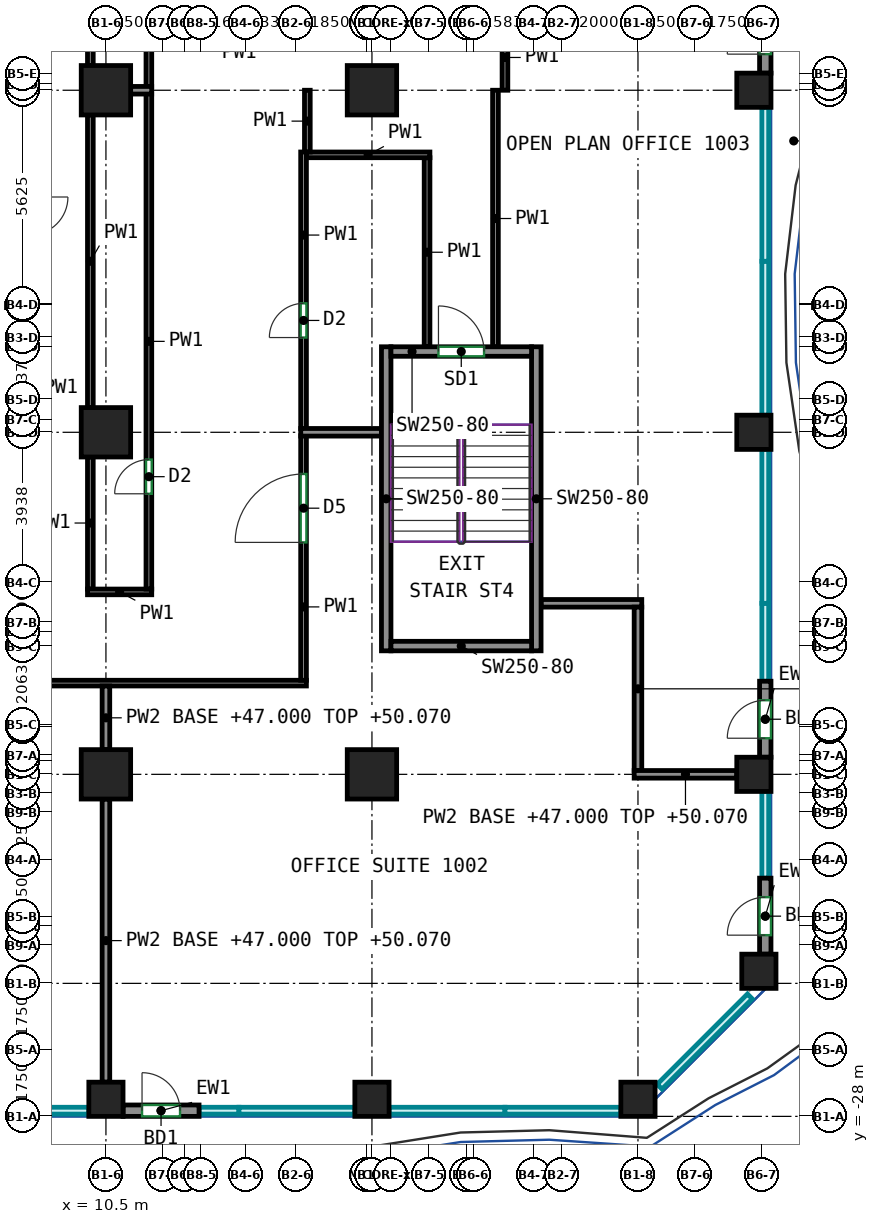
"""IFC4 building model, lengths in metres.
Left out: names, types, materials, properties, quantities, classifications, styles, units other than length and angle.
Written with IfcOpenShell. Run it as: python <this file> out.ifc"""

import sys

from ifc_helpers import new_model, si_unit, direction, frame, frame_2d, origin, origin_2d, place, context, subcontext, project, spatial, rectangle, extrude, source, transform, mapped, element, fill, save


model = new_model("IFC4")
c1 = context("Model", 3, precision=1e-05, world=origin(), true_north=direction((0.0, 1.0)))
c2 = subcontext(c1, "Body", "Model", "MODEL_VIEW")
j1 = project(units=[si_unit("LENGTHUNIT", "METRE"), si_unit("PLANEANGLEUNIT", "RADIAN")], contexts=[c1])
p1 = place(None, origin())
s1 = spatial("IfcSite", under=j1, at=p1, CompositionType="ELEMENT")
p2 = place(p1, origin())
s2 = spatial("IfcBuilding", under=s1, at=p2, CompositionType="ELEMENT")
p3 = place(p2, frame((0.0, 0.0, 47.0)))
s3 = spatial("IfcBuildingStorey", under=s2, at=p3, CompositionType="ELEMENT", Elevation=47.0)
m1 = source(origin(), c2, "Body", "SweptSolid", [
    extrude(rectangle(XDim=0.9, YDim=0.9, at=origin_2d()), origin(), (0.0, 0.0, 1.0), 3.72),
])
p4 = place(p3, frame((10.5, -27.55, 0.0), z_axis=(0.0, 0.0, 1.0), x_axis=(1.0, 0.0, 0.0)))
e1 = element("IfcColumn", 1, at=p4, inside=s3, PredefinedType="COLUMN", context=c2, shape_type="MappedRepresentation", body=[
    mapped(m1, transform((0.0, 0.0, 0.0))),
])
m2 = source(origin(), c2, "Body", "SweptSolid", [
    extrude(rectangle(XDim=1.3, YDim=1.3, at=origin_2d()), origin(), (0.0, 0.0, 1.0), 3.72),
])
for number, where, z_axis, x_axis in (
    (2, (10.5, -19.0, 0.0), (0.0, 0.0, 1.0), (1.0, 0.0, 0.0)),
    (3, (10.5, -10.0, 0.0), (0.0, 0.0, 1.0), (1.0, 0.0, 0.0)),
    (4, (10.5, -1.0, 0.0), (0.0, 0.0, 1.0), (1.0, 0.0, 0.0)),
):
    element("IfcColumn", number, at=place(p3, frame(where, z_axis=z_axis, x_axis=x_axis)), inside=s3, PredefinedType="COLUMN", context=c2, shape_type="MappedRepresentation", body=[
        mapped(m2, transform((0.0, 0.0, 0.0))),
    ])
p5 = place(p3, frame((17.5, -27.55, 0.0), z_axis=(0.0, 0.0, 1.0), x_axis=(1.0, 0.0, 0.0)))
e5 = element("IfcColumn", 5, at=p5, inside=s3, PredefinedType="COLUMN", context=c2, shape_type="MappedRepresentation", body=[
    mapped(m1, transform((0.0, 0.0, 0.0))),
])
for number, where, z_axis, x_axis in (
    (6, (17.5, -19.0, 0.0), (0.0, 0.0, 1.0), (1.0, 0.0, 0.0)),
    (7, (17.5, -1.0, 0.0), (0.0, 0.0, 1.0), (1.0, 0.0, 0.0)),
):
    element("IfcColumn", number, at=place(p3, frame(where, z_axis=z_axis, x_axis=x_axis)), inside=s3, PredefinedType="COLUMN", context=c2, shape_type="MappedRepresentation", body=[
        mapped(m2, transform((0.0, 0.0, 0.0))),
    ])
for number, where, z_axis, x_axis in (
    (8, (24.5, -27.55, 0.0), (0.0, 0.0, 1.0), (1.0, 0.0, 0.0)),
    (9, (27.55, -19.0, 0.0), (0.0, 0.0, 1.0), (1.0, 0.0, 0.0)),
    (10, (27.55, -10.0, 0.0), (0.0, 0.0, 1.0), (1.0, 0.0, 0.0)),
    (11, (27.55, -1.0, 0.0), (0.0, 0.0, 1.0), (1.0, 0.0, 0.0)),
    (12, (27.682, -24.182, 0.0), (0.0, 0.0, 1.0), (1.0, 0.0, 0.0)),
):
    element("IfcColumn", number, at=place(p3, frame(where, z_axis=z_axis, x_axis=x_axis)), inside=s3, PredefinedType="COLUMN", context=c2, shape_type="MappedRepresentation", body=[
        mapped(m1, transform((0.0, 0.0, 0.0))),
    ])
m3 = source(origin(), c2, "Body", "SweptSolid", [
    extrude(rectangle(XDim=8.0, YDim=0.25, at=frame_2d((4.0, 0.0))), origin(), (0.0, 0.0, 1.0), 3.72),
])
for number, where, z_axis, x_axis in (
    (13, (17.875, -15.75, 0.0), (0.0, 0.0, 1.0), (0.0, 1.0, 0.0)),
    (14, (21.825, -15.75, 0.0), (0.0, 0.0, 1.0), (0.0, 1.0, 0.0)),
):
    element("IfcWall", number, at=place(p3, frame(where, z_axis=z_axis, x_axis=x_axis)), inside=s3, PredefinedType="SHEAR", context=c2, shape_type="MappedRepresentation", body=[
        mapped(m3, transform((0.0, 0.0, 0.0))),
    ])
m4 = source(origin(), c2, "Body", "SweptSolid", [
    extrude(rectangle(XDim=3.7, YDim=0.25, at=frame_2d((1.85, 0.0))), origin(), (0.0, 0.0, 1.0), 3.72),
])
p6 = place(p3, frame((18.0, -15.625, 0.0), z_axis=(0.0, 0.0, 1.0), x_axis=(1.0, 0.0, 0.0)))
e15 = element("IfcWall", 15, at=p6, inside=s3, PredefinedType="SHEAR", context=c2, shape_type="MappedRepresentation", body=[
    mapped(m4, transform((0.0, 0.0, 0.0))),
])
p7 = place(p3, frame((18.0, -7.875, 0.0), z_axis=(0.0, 0.0, 1.0), x_axis=(1.0, 0.0, 0.0)))
e16 = element("IfcWall", 16, at=p7, inside=s3, PredefinedType="SHEAR", context=c2, shape_type="MappedRepresentation", body=[
    mapped(m4, transform((0.0, 0.0, 0.0))),
])
p8 = place(p7, frame((1.25, 0.0, 0.0)))
e17 = element("IfcOpeningElement", 17, at=p8, cuts=e16, PredefinedType="OPENING", context=c2, shape_type="SweptSolid", body=[
    extrude(rectangle(XDim=1.2, YDim=2.1, at=frame_2d((0.6, 1.05))), frame((0.0, 0.135, 0.0), z_axis=(0.0, -1.0, 0.0), x_axis=(1.0, 0.0, 0.0)), (0.0, 0.0, 1.0), 0.27),
])
m5 = source(origin(), c2, "Body", "SweptSolid", [
    extrude(rectangle(XDim=2.0, YDim=0.3, at=frame_2d((1.0, 0.0))), origin(), (0.0, 0.0, 1.0), 3.72),
])
p9 = place(p3, frame((10.95, -27.85, 0.0), z_axis=(0.0, 0.0, 1.0), x_axis=(1.0, 0.0, 0.0)))
e18 = element("IfcWall", 18, at=p9, inside=s3, PredefinedType="SOLIDWALL", context=c2, shape_type="MappedRepresentation", body=[
    mapped(m5, transform((0.0, 0.0, 0.0))),
])
p10 = place(p9, frame((0.5, 0.0, 0.0)))
e19 = element("IfcOpeningElement", 19, at=p10, cuts=e18, PredefinedType="OPENING", context=c2, shape_type="SweptSolid", body=[
    extrude(rectangle(XDim=1.0, YDim=2.1, at=frame_2d((0.5, 1.05))), frame((0.0, 0.16, 0.0), z_axis=(0.0, -1.0, 0.0), x_axis=(1.0, 0.0, 0.0)), (0.0, 0.0, 1.0), 0.32),
])
p11 = place(p3, frame((27.85, -23.732, 0.0), z_axis=(0.0, 0.0, 1.0), x_axis=(0.0, 1.0, 0.0)))
e20 = element("IfcWall", 20, at=p11, inside=s3, PredefinedType="SOLIDWALL", context=c2, shape_type="MappedRepresentation", body=[
    mapped(m5, transform((0.0, 0.0, 0.0))),
])
p12 = place(p11, frame((0.5, 0.0, 0.0)))
e21 = element("IfcOpeningElement", 21, at=p12, cuts=e20, PredefinedType="OPENING", context=c2, shape_type="SweptSolid", body=[
    extrude(rectangle(XDim=1.0, YDim=2.1, at=frame_2d((0.5, 1.05))), frame((0.0, 0.16, 0.0), z_axis=(0.0, -1.0, 0.0), x_axis=(1.0, 0.0, 0.0)), (0.0, 0.0, 1.0), 0.32),
])
p13 = place(p3, frame((27.85, -18.55, 0.0), z_axis=(0.0, 0.0, 1.0), x_axis=(0.0, 1.0, 0.0)))
e22 = element("IfcWall", 22, at=p13, inside=s3, PredefinedType="SOLIDWALL", context=c2, shape_type="MappedRepresentation", body=[
    mapped(m5, transform((0.0, 0.0, 0.0))),
])
p14 = place(p13, frame((0.5, 0.0, 0.0)))
e23 = element("IfcOpeningElement", 23, at=p14, cuts=e22, PredefinedType="OPENING", context=c2, shape_type="SweptSolid", body=[
    extrude(rectangle(XDim=1.0, YDim=2.1, at=frame_2d((0.5, 1.05))), frame((0.0, 0.16, 0.0), z_axis=(0.0, -1.0, 0.0), x_axis=(1.0, 0.0, 0.0)), (0.0, 0.0, 1.0), 0.32),
])
p15 = place(p3, frame((27.85, -0.55, 0.0), z_axis=(0.0, 0.0, 1.0), x_axis=(0.0, 1.0, 0.0)))
e24 = element("IfcWall", 24, at=p15, inside=s3, PredefinedType="SOLIDWALL", context=c2, shape_type="MappedRepresentation", body=[
    mapped(m5, transform((0.0, 0.0, 0.0))),
])
p16 = place(p15, frame((0.5, 0.0, 0.0)))
e25 = element("IfcOpeningElement", 25, at=p16, cuts=e24, PredefinedType="OPENING", context=c2, shape_type="SweptSolid", body=[
    extrude(rectangle(XDim=1.0, YDim=2.1, at=frame_2d((0.5, 1.05))), frame((0.0, 0.16, 0.0), z_axis=(0.0, -1.0, 0.0), x_axis=(1.0, 0.0, 0.0)), (0.0, 0.0, 1.0), 0.32),
])
p17 = place(p3, frame((10.09, -9.35, 0.0), z_axis=(0.0, 0.0, 1.0), x_axis=(0.0, 1.0, 0.0)))
e26 = element("IfcWall", 26, at=p17, inside=s3, PredefinedType="PARTITIONING", context=c2, shape_type="SweptSolid", body=[
    extrude(rectangle(XDim=7.7, YDim=0.15, at=frame_2d((3.85, 0.0))), origin(), (0.0, 0.0, 1.0), 3.72),
])
p18 = place(p3, frame((10.09, -14.125, 0.0), z_axis=(0.0, 0.0, 1.0), x_axis=(0.0, 1.0, 0.0)))
e27 = element("IfcWall", 27, at=p18, inside=s3, PredefinedType="PARTITIONING", context=c2, shape_type="SweptSolid", body=[
    extrude(rectangle(XDim=3.475, YDim=0.15, at=frame_2d((1.738, 0.0))), origin(), (0.0, 0.0, 1.0), 3.72),
])
p19 = place(p3, frame((10.015, -14.2, 0.0), z_axis=(0.0, 0.0, 1.0), x_axis=(1.0, 0.0, 0.0)))
e28 = element("IfcWall", 28, at=p19, inside=s3, PredefinedType="PARTITIONING", context=c2, shape_type="SweptSolid", body=[
    extrude(rectangle(XDim=1.69, YDim=0.15, at=frame_2d((0.845, 0.0))), origin(), (0.0, 0.0, 1.0), 3.72),
])
p20 = place(p3, frame((11.63, -14.125, 0.0), z_axis=(0.0, 0.0, 1.0), x_axis=(0.0, 1.0, 0.0)))
e29 = element("IfcWall", 29, at=p20, inside=s3, PredefinedType="PARTITIONING", context=c2, shape_type="SweptSolid", body=[
    extrude(rectangle(XDim=13.035, YDim=0.15, at=frame_2d((6.518, 0.0))), origin(), (0.0, 0.0, 1.0), 3.72),
])
p21 = place(p20, frame((2.507, 0.0, 0.0)))
e30 = element("IfcOpeningElement", 30, at=p21, cuts=e29, PredefinedType="OPENING", context=c2, shape_type="SweptSolid", body=[
    extrude(rectangle(XDim=0.9, YDim=2.1, at=frame_2d((0.45, 1.05))), frame((0.0, 0.085, 0.0), z_axis=(0.0, -1.0, 0.0), x_axis=(1.0, 0.0, 0.0)), (0.0, 0.0, 1.0), 0.17),
])
p22 = place(p3, frame((10.09, -0.35, 0.0), z_axis=(0.0, 0.0, 1.0), x_axis=(0.0, 1.0, 0.0)))
e31 = element("IfcWall", 31, at=p22, inside=s3, PredefinedType="PARTITIONING", context=c2, shape_type="SweptSolid", body=[
    extrude(rectangle(XDim=8.35, YDim=0.15, at=frame_2d((4.175, 0.0))), origin(), (0.0, 0.0, 1.0), 3.72),
])
p23 = place(p22, frame((4.732, 0.0, 0.0)))
e32 = element("IfcOpeningElement", 32, at=p23, cuts=e31, PredefinedType="OPENING", context=c2, shape_type="SweptSolid", body=[
    extrude(rectangle(XDim=0.9, YDim=2.1, at=frame_2d((0.45, 1.05))), frame((0.0, 0.085, 0.0), z_axis=(0.0, -1.0, 0.0), x_axis=(1.0, 0.0, 0.0)), (0.0, 0.0, 1.0), 0.17),
])
p24 = place(p3, frame((11.63, -0.91, 0.0), z_axis=(0.0, 0.0, 1.0), x_axis=(0.0, 1.0, 0.0)))
e33 = element("IfcWall", 33, at=p24, inside=s3, PredefinedType="PARTITIONING", context=c2, shape_type="SweptSolid", body=[
    extrude(rectangle(XDim=6.26, YDim=0.15, at=frame_2d((3.13, 0.0))), origin(), (0.0, 0.0, 1.0), 3.72),
])
p25 = place(p3, frame((-10.51, -16.6, 0.0), z_axis=(0.0, 0.0, 1.0), x_axis=(1.0, 0.0, 0.0)))
e34 = element("IfcWall", 34, at=p25, inside=s3, PredefinedType="PARTITIONING", context=c2, shape_type="SweptSolid", body=[
    extrude(rectangle(XDim=26.285, YDim=0.15, at=frame_2d((13.143, 0.0))), origin(), (0.0, 0.0, 1.0), 3.72),
])
p26 = place(p25, frame((7.708, 0.0, 0.0)))
e35 = element("IfcOpeningElement", 35, at=p26, cuts=e34, PredefinedType="OPENING", context=c2, shape_type="SweptSolid", body=[
    extrude(rectangle(XDim=1.8, YDim=2.1, at=frame_2d((0.9, 1.05))), frame((0.0, 0.085, 0.0), z_axis=(0.0, -1.0, 0.0), x_axis=(1.0, 0.0, 0.0)), (0.0, 0.0, 1.0), 0.17),
])
p27 = place(p3, frame((15.7, -16.525, 0.0), z_axis=(0.0, 0.0, 1.0), x_axis=(0.0, 1.0, 0.0)))
e36 = element("IfcWall", 36, at=p27, inside=s3, PredefinedType="PARTITIONING", context=c2, shape_type="SweptSolid", body=[
    extrude(rectangle(XDim=6.435, YDim=0.15, at=frame_2d((3.217, 0.0))), origin(), (0.0, 0.0, 1.0), 3.72),
])
p28 = place(p27, frame((3.628, 0.0, 0.0)))
e37 = element("IfcOpeningElement", 37, at=p28, cuts=e36, PredefinedType="OPENING", context=c2, shape_type="SweptSolid", body=[
    extrude(rectangle(XDim=1.8, YDim=2.1, at=frame_2d((0.9, 1.05))), frame((0.0, 0.085, 0.0), z_axis=(0.0, -1.0, 0.0), x_axis=(1.0, 0.0, 0.0)), (0.0, 0.0, 1.0), 0.17),
])
p29 = place(p3, frame((18.95, -2.775, 0.0), z_axis=(0.0, 0.0, 1.0), x_axis=(0.0, -1.0, 0.0)))
e38 = element("IfcWall", 38, at=p29, inside=s3, PredefinedType="PARTITIONING", context=c2, shape_type="SweptSolid", body=[
    extrude(rectangle(XDim=4.975, YDim=0.15, at=frame_2d((2.488, 0.0))), origin(), (0.0, 0.0, 1.0), 3.72),
])
p30 = place(p3, frame((15.775, -2.7, 0.0), z_axis=(0.0, 0.0, 1.0), x_axis=(1.0, 0.0, 0.0)))
e39 = element("IfcWall", 39, at=p30, inside=s3, PredefinedType="PARTITIONING", context=c2, shape_type="SweptSolid", body=[
    extrude(rectangle(XDim=3.25, YDim=0.15, at=frame_2d((1.625, 0.0))), origin(), (0.0, 0.0, 1.0), 3.72),
])
p31 = place(p3, frame((15.8, -2.625, 0.0), z_axis=(0.0, 0.0, 1.0), x_axis=(0.0, 1.0, 0.0)))
e40 = element("IfcWall", 40, at=p31, inside=s3, PredefinedType="PARTITIONING", context=c2, shape_type="SweptSolid", body=[
    extrude(rectangle(XDim=1.625, YDim=0.15, at=frame_2d((0.812, 0.0))), origin(), (0.0, 0.0, 1.0), 3.72),
])
p32 = place(p3, frame((15.7, -9.91, 0.0), z_axis=(0.0, 0.0, 1.0), x_axis=(0.0, 1.0, 0.0)))
e41 = element("IfcWall", 41, at=p32, inside=s3, PredefinedType="PARTITIONING", context=c2, shape_type="SweptSolid", body=[
    extrude(rectangle(XDim=7.285, YDim=0.15, at=frame_2d((3.643, 0.0))), origin(), (0.0, 0.0, 1.0), 3.72),
])
p33 = place(p32, frame((2.403, 0.0, 0.0)))
e42 = element("IfcOpeningElement", 42, at=p33, cuts=e41, PredefinedType="OPENING", context=c2, shape_type="SweptSolid", body=[
    extrude(rectangle(XDim=0.9, YDim=2.1, at=frame_2d((0.45, 1.05))), frame((0.0, 0.085, 0.0), z_axis=(0.0, -1.0, 0.0), x_axis=(1.0, 0.0, 0.0)), (0.0, 0.0, 1.0), 0.17),
])
p34 = place(p3, frame((21.0, -1.0, 0.0), z_axis=(0.0, 0.0, 1.0), x_axis=(0.0, 1.0, 0.0)))
e43 = element("IfcWall", 43, at=p34, inside=s3, PredefinedType="PARTITIONING", context=c2, shape_type="SweptSolid", body=[
    extrude(rectangle(XDim=1.725, YDim=0.15, at=frame_2d((0.863, 0.0))), origin(), (0.0, 0.0, 1.0), 3.72),
])
p35 = place(p3, frame((20.75, -7.75, 0.0), z_axis=(0.0, 0.0, 1.0), x_axis=(0.0, 1.0, 0.0)))
e44 = element("IfcWall", 44, at=p35, inside=s3, PredefinedType="PARTITIONING", context=c2, shape_type="SweptSolid", body=[
    extrude(rectangle(XDim=6.75, YDim=0.15, at=frame_2d((3.375, 0.0))), origin(), (0.0, 0.0, 1.0), 3.72),
])
p36 = place(p3, frame((11.15, -1.0, 0.0), z_axis=(0.0, 0.0, 1.0), x_axis=(1.0, 0.0, 0.0)))
e45 = element("IfcWall", 45, at=p36, inside=s3, PredefinedType="PARTITIONING", context=c2, shape_type="SweptSolid", body=[
    extrude(rectangle(XDim=0.554, YDim=0.2, at=frame_2d((0.277, 0.0))), origin(), (0.0, 0.0, 1.0), 3.72),
])
p37 = place(p3, frame((10.5, -18.35, 0.0), z_axis=(0.0, 0.0, 1.0), x_axis=(0.0, 1.0, 0.0)))
e46 = element("IfcWall", 46, at=p37, inside=s3, PredefinedType="PARTITIONING", context=c2, shape_type="SweptSolid", body=[
    extrude(rectangle(XDim=1.674, YDim=0.2, at=frame_2d((0.837, 0.0))), origin(), (0.0, 0.0, 1.0), 3.07),
])
p38 = place(p3, frame((10.5, -27.1, 0.0), z_axis=(0.0, 0.0, 1.0), x_axis=(0.0, 1.0, 0.0)))
e47 = element("IfcWall", 47, at=p38, inside=s3, PredefinedType="PARTITIONING", context=c2, shape_type="SweptSolid", body=[
    extrude(rectangle(XDim=7.45, YDim=0.2, at=frame_2d((3.725, 0.0))), origin(), (0.0, 0.0, 1.0), 3.07),
])
p39 = place(p3, frame((17.75, -10.0, 0.0), z_axis=(0.0, 0.0, 1.0), x_axis=(-1.0, 0.0, 0.0)))
e48 = element("IfcWall", 48, at=p39, inside=s3, PredefinedType="PARTITIONING", context=c2, shape_type="SweptSolid", body=[
    extrude(rectangle(XDim=2.124, YDim=0.2, at=frame_2d((1.062, 0.0))), origin(), (0.0, 0.0, 1.0), 3.72),
])
p40 = place(p3, frame((24.6, -14.5, 0.0), z_axis=(0.0, 0.0, 1.0), x_axis=(-1.0, 0.0, 0.0)))
e49 = element("IfcWall", 49, at=p40, inside=s3, PredefinedType="PARTITIONING", context=c2, shape_type="SweptSolid", body=[
    extrude(rectangle(XDim=2.65, YDim=0.2, at=frame_2d((1.325, 0.0))), origin(), (0.0, 0.0, 1.0), 3.72),
])
p41 = place(p3, frame((24.5, -18.9, 0.0), z_axis=(0.0, 0.0, 1.0), x_axis=(0.0, 1.0, 0.0)))
e50 = element("IfcWall", 50, at=p41, inside=s3, PredefinedType="PARTITIONING", context=c2, shape_type="SweptSolid", body=[
    extrude(rectangle(XDim=4.3, YDim=0.2, at=frame_2d((2.15, 0.0))), origin(), (0.0, 0.0, 1.0), 3.07),
])
p42 = place(p3, frame((27.1, -19.0, 0.0), z_axis=(0.0, 0.0, 1.0), x_axis=(-1.0, 0.0, 0.0)))
e51 = element("IfcWall", 51, at=p42, inside=s3, PredefinedType="PARTITIONING", context=c2, shape_type="SweptSolid", body=[
    extrude(rectangle(XDim=2.7, YDim=0.2, at=frame_2d((1.35, 0.0))), origin(), (0.0, 0.0, 1.0), 3.07),
])
p43 = place(p10, origin())
e52 = element("IfcDoor", 52, at=p43, inside=s3, OperationType="SINGLE_SWING_LEFT", PredefinedType="DOOR", context=c2, shape_type="SweptSolid", body=[
    extrude(rectangle(XDim=1.0, YDim=2.1, at=frame_2d((0.5, 1.05))), frame((0.0, 0.025, 0.0), z_axis=(0.0, -1.0, 0.0), x_axis=(1.0, 0.0, 0.0)), (0.0, 0.0, 1.0), 0.05),
])
fill(e19, e52)
p44 = place(p12, origin())
e53 = element("IfcDoor", 53, at=p44, inside=s3, OperationType="SINGLE_SWING_LEFT", PredefinedType="DOOR", context=c2, shape_type="SweptSolid", body=[
    extrude(rectangle(XDim=1.0, YDim=2.1, at=frame_2d((0.5, 1.05))), frame((0.0, 0.025, 0.0), z_axis=(0.0, -1.0, 0.0), x_axis=(1.0, 0.0, 0.0)), (0.0, 0.0, 1.0), 0.05),
])
fill(e21, e53)
p45 = place(p14, origin())
e54 = element("IfcDoor", 54, at=p45, inside=s3, OperationType="SINGLE_SWING_LEFT", PredefinedType="DOOR", context=c2, shape_type="SweptSolid", body=[
    extrude(rectangle(XDim=1.0, YDim=2.1, at=frame_2d((0.5, 1.05))), frame((0.0, 0.025, 0.0), z_axis=(0.0, -1.0, 0.0), x_axis=(1.0, 0.0, 0.0)), (0.0, 0.0, 1.0), 0.05),
])
fill(e23, e54)
p46 = place(p16, origin())
e55 = element("IfcDoor", 55, at=p46, inside=s3, OperationType="SINGLE_SWING_LEFT", PredefinedType="DOOR", context=c2, shape_type="SweptSolid", body=[
    extrude(rectangle(XDim=1.0, YDim=2.1, at=frame_2d((0.5, 1.05))), frame((0.0, 0.025, 0.0), z_axis=(0.0, -1.0, 0.0), x_axis=(1.0, 0.0, 0.0)), (0.0, 0.0, 1.0), 0.05),
])
fill(e25, e55)
p47 = place(p8, origin())
e56 = element("IfcDoor", 56, at=p47, inside=s3, OperationType="DOUBLE_DOOR_SINGLE_SWING", PredefinedType="DOOR", context=c2, shape_type="SweptSolid", body=[
    extrude(rectangle(XDim=1.2, YDim=2.1, at=frame_2d((0.6, 1.05))), frame((0.0, 0.025, 0.0), z_axis=(0.0, -1.0, 0.0), x_axis=(1.0, 0.0, 0.0)), (0.0, 0.0, 1.0), 0.05),
])
fill(e17, e56)
p48 = place(p28, origin())
e57 = element("IfcDoor", 57, at=p48, inside=s3, OperationType="DOUBLE_DOOR_SINGLE_SWING", PredefinedType="DOOR", context=c2, shape_type="SweptSolid", body=[
    extrude(rectangle(XDim=1.8, YDim=2.1, at=frame_2d((0.9, 1.05))), frame((0.0, 0.025, 0.0), z_axis=(0.0, -1.0, 0.0), x_axis=(1.0, 0.0, 0.0)), (0.0, 0.0, 1.0), 0.05),
])
fill(e37, e57)
p49 = place(p21, origin())
e58 = element("IfcDoor", 58, at=p49, inside=s3, OperationType="SINGLE_SWING_LEFT", PredefinedType="DOOR", context=c2, shape_type="SweptSolid", body=[
    extrude(rectangle(XDim=0.9, YDim=2.1, at=frame_2d((0.45, 1.05))), frame((0.0, 0.025, 0.0), z_axis=(0.0, -1.0, 0.0), x_axis=(1.0, 0.0, 0.0)), (0.0, 0.0, 1.0), 0.05),
])
fill(e30, e58)
p50 = place(p33, origin())
e59 = element("IfcDoor", 59, at=p50, inside=s3, OperationType="SINGLE_SWING_LEFT", PredefinedType="DOOR", context=c2, shape_type="SweptSolid", body=[
    extrude(rectangle(XDim=0.9, YDim=2.1, at=frame_2d((0.45, 1.05))), frame((0.0, 0.025, 0.0), z_axis=(0.0, -1.0, 0.0), x_axis=(1.0, 0.0, 0.0)), (0.0, 0.0, 1.0), 0.05),
])
fill(e42, e59)
save(model, sys.argv[1])
